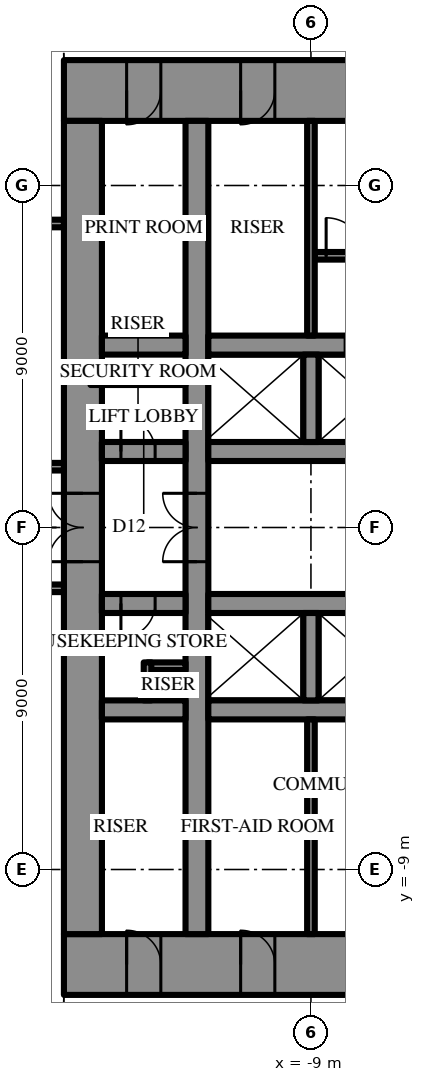
"""IFC4 building model, lengths in metres.
Left out: names, types, materials, properties, quantities, classifications, styles, units other than length and angle.
Written with IfcOpenShell. Run it as: python <this file> out.ifc"""

import sys

from ifc_helpers import new_model, si_unit, direction, frame, frame_2d, origin, place, context, subcontext, project, spatial, rectangle, extrude, element, fill, save


model = new_model("IFC4")
c1 = context("Model", 3, precision=1e-05, world=origin(), true_north=direction((0.0, 1.0)))
c2 = subcontext(c1, "Body", "Model", "MODEL_VIEW")
j1 = project(units=[si_unit("LENGTHUNIT", "METRE"), si_unit("PLANEANGLEUNIT", "RADIAN")], contexts=[c1])
p1 = place(None, origin())
s1 = spatial("IfcSite", under=j1, at=p1, CompositionType="ELEMENT")
p2 = place(p1, origin())
s2 = spatial("IfcBuilding", under=s1, at=p2, CompositionType="ELEMENT")
p3 = place(p2, frame((0.0, 0.0, 244.9)))
s3 = spatial("IfcBuildingStorey", under=s2, at=p3, CompositionType="ELEMENT", Elevation=244.9)
p4 = place(p3, frame((-15.5, 11.5, 0.0), z_axis=(0.0, 0.0, 1.0), x_axis=(1.0, 0.0, 0.0)))
e1 = element("IfcWall", 1, at=p4, inside=s3, PredefinedType="SHEAR", context=c2, shape_type="SweptSolid", body=[
    extrude(rectangle(XDim=31.0, YDim=1.6, at=frame_2d((15.5, 0.0))), origin(), (0.0, 0.0, 1.0), 4.2),
])
p5 = place(p4, frame((16.35, 0.0, 0.0)))
e2 = element("IfcOpeningElement", 2, at=p5, cuts=e1, PredefinedType="OPENING", context=c2, shape_type="SweptSolid", body=[
    extrude(rectangle(XDim=0.9, YDim=2.2, at=frame_2d((0.45, 1.1))), frame((0.0, 0.81, 0.0), z_axis=(0.0, -1.0, 0.0), x_axis=(1.0, 0.0, 0.0)), (0.0, 0.0, 1.0), 1.62),
])
p6 = place(p4, frame((19.35, 0.0, 0.0)))
e3 = element("IfcOpeningElement", 3, at=p6, cuts=e1, PredefinedType="OPENING", context=c2, shape_type="SweptSolid", body=[
    extrude(rectangle(XDim=0.9, YDim=2.2, at=frame_2d((0.45, 1.1))), frame((0.0, 0.81, 0.0), z_axis=(0.0, -1.0, 0.0), x_axis=(1.0, 0.0, 0.0)), (0.0, 0.0, 1.0), 1.62),
])
p7 = place(p4, frame((22.4, 0.0, 0.0)))
e4 = element("IfcOpeningElement", 4, at=p7, cuts=e1, PredefinedType="OPENING", context=c2, shape_type="SweptSolid", body=[
    extrude(rectangle(XDim=1.0, YDim=2.2, at=frame_2d((0.5, 1.1))), frame((0.0, 0.81, 0.0), z_axis=(0.0, -1.0, 0.0), x_axis=(1.0, 0.0, 0.0)), (0.0, 0.0, 1.0), 1.62),
])
p8 = place(p4, frame((1.65, 0.0, 0.0)))
e5 = element("IfcOpeningElement", 5, at=p8, cuts=e1, PredefinedType="OPENING", context=c2, shape_type="SweptSolid", body=[
    extrude(rectangle(XDim=0.9, YDim=2.2, at=frame_2d((0.45, 1.1))), frame((0.0, 0.81, 0.0), z_axis=(0.0, -1.0, 0.0), x_axis=(1.0, 0.0, 0.0)), (0.0, 0.0, 1.0), 1.62),
])
p9 = place(p4, frame((4.65, 0.0, 0.0)))
e6 = element("IfcOpeningElement", 6, at=p9, cuts=e1, PredefinedType="OPENING", context=c2, shape_type="SweptSolid", body=[
    extrude(rectangle(XDim=0.9, YDim=2.2, at=frame_2d((0.45, 1.1))), frame((0.0, 0.81, 0.0), z_axis=(0.0, -1.0, 0.0), x_axis=(1.0, 0.0, 0.0)), (0.0, 0.0, 1.0), 1.62),
])
p10 = place(p4, frame((25.45, 0.0, 0.0)))
e7 = element("IfcOpeningElement", 7, at=p10, cuts=e1, PredefinedType="OPENING", context=c2, shape_type="SweptSolid", body=[
    extrude(rectangle(XDim=0.9, YDim=2.2, at=frame_2d((0.45, 1.1))), frame((0.0, 0.81, 0.0), z_axis=(0.0, -1.0, 0.0), x_axis=(1.0, 0.0, 0.0)), (0.0, 0.0, 1.0), 1.62),
])
p11 = place(p4, frame((28.45, 0.0, 0.0)))
e8 = element("IfcOpeningElement", 8, at=p11, cuts=e1, PredefinedType="OPENING", context=c2, shape_type="SweptSolid", body=[
    extrude(rectangle(XDim=0.9, YDim=2.2, at=frame_2d((0.45, 1.1))), frame((0.0, 0.81, 0.0), z_axis=(0.0, -1.0, 0.0), x_axis=(1.0, 0.0, 0.0)), (0.0, 0.0, 1.0), 1.62),
])
p12 = place(p3, frame((15.5, -11.5, 0.0), z_axis=(0.0, 0.0, 1.0), x_axis=(-1.0, 0.0, 0.0)))
e9 = element("IfcWall", 9, at=p12, inside=s3, PredefinedType="SHEAR", context=c2, shape_type="SweptSolid", body=[
    extrude(rectangle(XDim=31.0, YDim=1.6, at=frame_2d((15.5, 0.0))), origin(), (0.0, 0.0, 1.0), 4.2),
])
p13 = place(p12, frame((16.35, 0.0, 0.0)))
e10 = element("IfcOpeningElement", 10, at=p13, cuts=e9, PredefinedType="OPENING", context=c2, shape_type="SweptSolid", body=[
    extrude(rectangle(XDim=0.9, YDim=2.2, at=frame_2d((0.45, 1.1))), frame((0.0, 0.81, 0.0), z_axis=(0.0, -1.0, 0.0), x_axis=(1.0, 0.0, 0.0)), (0.0, 0.0, 1.0), 1.62),
])
p14 = place(p12, frame((19.35, 0.0, 0.0)))
e11 = element("IfcOpeningElement", 11, at=p14, cuts=e9, PredefinedType="OPENING", context=c2, shape_type="SweptSolid", body=[
    extrude(rectangle(XDim=0.9, YDim=2.2, at=frame_2d((0.45, 1.1))), frame((0.0, 0.81, 0.0), z_axis=(0.0, -1.0, 0.0), x_axis=(1.0, 0.0, 0.0)), (0.0, 0.0, 1.0), 1.62),
])
p15 = place(p12, frame((22.4, 0.0, 0.0)))
e12 = element("IfcOpeningElement", 12, at=p15, cuts=e9, PredefinedType="OPENING", context=c2, shape_type="SweptSolid", body=[
    extrude(rectangle(XDim=1.0, YDim=2.2, at=frame_2d((0.5, 1.1))), frame((0.0, 0.81, 0.0), z_axis=(0.0, -1.0, 0.0), x_axis=(1.0, 0.0, 0.0)), (0.0, 0.0, 1.0), 1.62),
])
p16 = place(p12, frame((1.65, 0.0, 0.0)))
e13 = element("IfcOpeningElement", 13, at=p16, cuts=e9, PredefinedType="OPENING", context=c2, shape_type="SweptSolid", body=[
    extrude(rectangle(XDim=0.9, YDim=2.2, at=frame_2d((0.45, 1.1))), frame((0.0, 0.81, 0.0), z_axis=(0.0, -1.0, 0.0), x_axis=(1.0, 0.0, 0.0)), (0.0, 0.0, 1.0), 1.62),
])
p17 = place(p12, frame((4.65, 0.0, 0.0)))
e14 = element("IfcOpeningElement", 14, at=p17, cuts=e9, PredefinedType="OPENING", context=c2, shape_type="SweptSolid", body=[
    extrude(rectangle(XDim=0.9, YDim=2.2, at=frame_2d((0.45, 1.1))), frame((0.0, 0.81, 0.0), z_axis=(0.0, -1.0, 0.0), x_axis=(1.0, 0.0, 0.0)), (0.0, 0.0, 1.0), 1.62),
])
p18 = place(p12, frame((25.45, 0.0, 0.0)))
e15 = element("IfcOpeningElement", 15, at=p18, cuts=e9, PredefinedType="OPENING", context=c2, shape_type="SweptSolid", body=[
    extrude(rectangle(XDim=0.9, YDim=2.2, at=frame_2d((0.45, 1.1))), frame((0.0, 0.81, 0.0), z_axis=(0.0, -1.0, 0.0), x_axis=(1.0, 0.0, 0.0)), (0.0, 0.0, 1.0), 1.62),
])
p19 = place(p12, frame((28.45, 0.0, 0.0)))
e16 = element("IfcOpeningElement", 16, at=p19, cuts=e9, PredefinedType="OPENING", context=c2, shape_type="SweptSolid", body=[
    extrude(rectangle(XDim=0.9, YDim=2.2, at=frame_2d((0.45, 1.1))), frame((0.0, 0.81, 0.0), z_axis=(0.0, -1.0, 0.0), x_axis=(1.0, 0.0, 0.0)), (0.0, 0.0, 1.0), 1.62),
])
p20 = place(p3, frame((-15.0, 10.7, 0.0), z_axis=(0.0, 0.0, 1.0), x_axis=(0.0, -1.0, 0.0)))
e17 = element("IfcWall", 17, at=p20, inside=s3, PredefinedType="SHEAR", context=c2, shape_type="SweptSolid", body=[
    extrude(rectangle(XDim=21.4, YDim=1.0, at=frame_2d((10.7, 0.0))), origin(), (0.0, 0.0, 1.0), 4.2),
])
p21 = place(p20, frame((9.8, 0.0, 0.0)))
e18 = element("IfcOpeningElement", 18, at=p21, cuts=e17, PredefinedType="OPENING", context=c2, shape_type="SweptSolid", body=[
    extrude(rectangle(XDim=1.8, YDim=2.4, at=frame_2d((0.9, 1.2))), frame((0.0, 0.51, 0.0), z_axis=(0.0, -1.0, 0.0), x_axis=(1.0, 0.0, 0.0)), (0.0, 0.0, 1.0), 1.02),
])
p22 = place(p3, frame((-12.0, -10.7, 0.0), z_axis=(0.0, 0.0, 1.0), x_axis=(0.0, 1.0, 0.0)))
e19 = element("IfcWall", 19, at=p22, inside=s3, PredefinedType="SHEAR", context=c2, shape_type="SweptSolid", body=[
    extrude(rectangle(XDim=21.4, YDim=0.6, at=frame_2d((10.7, 0.0))), origin(), (0.0, 0.0, 1.0), 4.2),
])
p23 = place(p22, frame((9.8, 0.0, 0.0)))
e20 = element("IfcOpeningElement", 20, at=p23, cuts=e19, PredefinedType="OPENING", context=c2, shape_type="SweptSolid", body=[
    extrude(rectangle(XDim=1.8, YDim=2.4, at=frame_2d((0.9, 1.2))), frame((0.0, 0.31, 0.0), z_axis=(0.0, -1.0, 0.0), x_axis=(1.0, 0.0, 0.0)), (0.0, 0.0, 1.0), 0.62),
])
p24 = place(p3, frame((-14.5, 2.0, 0.0), z_axis=(0.0, 0.0, 1.0), x_axis=(1.0, 0.0, 0.0)))
e21 = element("IfcWall", 21, at=p24, inside=s3, PredefinedType="SHEAR", context=c2, shape_type="SweptSolid", body=[
    extrude(rectangle(XDim=2.2, YDim=0.5, at=frame_2d((1.1, 0.0))), origin(), (0.0, 0.0, 1.0), 4.2),
])
p25 = place(p24, frame((0.5, 0.0, 0.0)))
e22 = element("IfcOpeningElement", 22, at=p25, cuts=e21, PredefinedType="OPENING", context=c2, shape_type="SweptSolid", body=[
    extrude(rectangle(XDim=0.9, YDim=2.2, at=frame_2d((0.45, 1.1))), frame((0.0, 0.26, 0.0), z_axis=(0.0, -1.0, 0.0), x_axis=(1.0, 0.0, 0.0)), (0.0, 0.0, 1.0), 0.52),
])
p26 = place(p3, frame((-11.7, 2.0, 0.0), z_axis=(0.0, 0.0, 1.0), x_axis=(1.0, 0.0, 0.0)))
e23 = element("IfcWall", 23, at=p26, inside=s3, PredefinedType="SHEAR", context=c2, shape_type="SweptSolid", body=[
    extrude(rectangle(XDim=5.9, YDim=0.5, at=frame_2d((2.95, 0.0))), origin(), (0.0, 0.0, 1.0), 4.2),
])
p27 = place(p3, frame((-14.5, 4.8, 0.0), z_axis=(0.0, 0.0, 1.0), x_axis=(1.0, 0.0, 0.0)))
e24 = element("IfcWall", 24, at=p27, inside=s3, PredefinedType="SHEAR", context=c2, shape_type="SweptSolid", body=[
    extrude(rectangle(XDim=2.2, YDim=0.5, at=frame_2d((1.1, 0.0))), origin(), (0.0, 0.0, 1.0), 4.2),
])
p28 = place(p3, frame((-11.7, 4.8, 0.0), z_axis=(0.0, 0.0, 1.0), x_axis=(1.0, 0.0, 0.0)))
e25 = element("IfcWall", 25, at=p28, inside=s3, PredefinedType="SHEAR", context=c2, shape_type="SweptSolid", body=[
    extrude(rectangle(XDim=23.4, YDim=0.5, at=frame_2d((11.7, 0.0))), origin(), (0.0, 0.0, 1.0), 4.2),
])
p29 = place(p28, frame((6.6, 0.0, 0.0)))
e26 = element("IfcOpeningElement", 26, at=p29, cuts=e25, PredefinedType="OPENING", context=c2, shape_type="SweptSolid", body=[
    extrude(rectangle(XDim=1.2, YDim=2.2, at=frame_2d((0.6, 1.1))), frame((0.0, 0.26, 0.0), z_axis=(0.0, -1.0, 0.0), x_axis=(1.0, 0.0, 0.0)), (0.0, 0.0, 1.0), 0.52),
])
p30 = place(p28, frame((3.6, 0.0, 0.0)))
e27 = element("IfcOpeningElement", 27, at=p30, cuts=e25, PredefinedType="OPENING", context=c2, shape_type="SweptSolid", body=[
    extrude(rectangle(XDim=1.2, YDim=2.2, at=frame_2d((0.6, 1.1))), frame((0.0, 0.26, 0.0), z_axis=(0.0, -1.0, 0.0), x_axis=(1.0, 0.0, 0.0)), (0.0, 0.0, 1.0), 0.52),
])
p31 = place(p3, frame((-9.0, 2.25, 0.0), z_axis=(0.0, 0.0, 1.0), x_axis=(0.0, 1.0, 0.0)))
e28 = element("IfcWall", 28, at=p31, inside=s3, PredefinedType="SHEAR", context=c2, shape_type="SweptSolid", body=[
    extrude(rectangle(XDim=2.3, YDim=0.4, at=frame_2d((1.15, 0.0))), origin(), (0.0, 0.0, 1.0), 4.2),
])
p32 = place(p3, frame((-8.9, 7.15, 0.0), z_axis=(0.0, 0.0, 1.0), x_axis=(1.0, 0.0, 0.0)))
e29 = element("IfcWall", 29, at=p32, inside=s3, PredefinedType="SHEAR", context=c2, shape_type="SweptSolid", body=[
    extrude(rectangle(XDim=8.6, YDim=0.2, at=frame_2d((4.3, 0.0))), origin(), (0.0, 0.0, 1.0), 4.2),
])
p33 = place(p32, frame((0.3, 0.0, 0.0)))
e30 = element("IfcOpeningElement", 30, at=p33, cuts=e29, PredefinedType="OPENING", context=c2, shape_type="SweptSolid", body=[
    extrude(rectangle(XDim=1.0, YDim=2.2, at=frame_2d((0.5, 1.1))), frame((0.0, 0.11, 0.0), z_axis=(0.0, -1.0, 0.0), x_axis=(1.0, 0.0, 0.0)), (0.0, 0.0, 1.0), 0.22),
])
p34 = place(p3, frame((3.2, -2.0, 0.0), z_axis=(0.0, 0.0, 1.0), x_axis=(-1.0, 0.0, 0.0)))
e31 = element("IfcWall", 31, at=p34, inside=s3, PredefinedType="SHEAR", context=c2, shape_type="SweptSolid", body=[
    extrude(rectangle(XDim=14.9, YDim=0.5, at=frame_2d((7.45, 0.0))), origin(), (0.0, 0.0, 1.0), 4.2),
])
p35 = place(p34, frame((1.15, 0.0, 0.0)))
e32 = element("IfcOpeningElement", 32, at=p35, cuts=e31, PredefinedType="OPENING", context=c2, shape_type="SweptSolid", body=[
    extrude(rectangle(XDim=1.1, YDim=2.2, at=frame_2d((0.55, 1.1))), frame((0.0, 0.26, 0.0), z_axis=(0.0, -1.0, 0.0), x_axis=(1.0, 0.0, 0.0)), (0.0, 0.0, 1.0), 0.52),
])
p36 = place(p34, frame((4.15, 0.0, 0.0)))
e33 = element("IfcOpeningElement", 33, at=p36, cuts=e31, PredefinedType="OPENING", context=c2, shape_type="SweptSolid", body=[
    extrude(rectangle(XDim=1.1, YDim=2.2, at=frame_2d((0.55, 1.1))), frame((0.0, 0.26, 0.0), z_axis=(0.0, -1.0, 0.0), x_axis=(1.0, 0.0, 0.0)), (0.0, 0.0, 1.0), 0.52),
])
p37 = place(p34, frame((7.15, 0.0, 0.0)))
e34 = element("IfcOpeningElement", 34, at=p37, cuts=e31, PredefinedType="OPENING", context=c2, shape_type="SweptSolid", body=[
    extrude(rectangle(XDim=1.1, YDim=2.2, at=frame_2d((0.55, 1.1))), frame((0.0, 0.26, 0.0), z_axis=(0.0, -1.0, 0.0), x_axis=(1.0, 0.0, 0.0)), (0.0, 0.0, 1.0), 0.52),
])
p38 = place(p34, frame((10.15, 0.0, 0.0)))
e35 = element("IfcOpeningElement", 35, at=p38, cuts=e31, PredefinedType="OPENING", context=c2, shape_type="SweptSolid", body=[
    extrude(rectangle(XDim=1.1, YDim=2.2, at=frame_2d((0.55, 1.1))), frame((0.0, 0.26, 0.0), z_axis=(0.0, -1.0, 0.0), x_axis=(1.0, 0.0, 0.0)), (0.0, 0.0, 1.0), 0.52),
])
p39 = place(p3, frame((-12.3, -2.0, 0.0), z_axis=(0.0, 0.0, 1.0), x_axis=(-1.0, 0.0, 0.0)))
e36 = element("IfcWall", 36, at=p39, inside=s3, PredefinedType="SHEAR", context=c2, shape_type="SweptSolid", body=[
    extrude(rectangle(XDim=2.2, YDim=0.5, at=frame_2d((1.1, 0.0))), origin(), (0.0, 0.0, 1.0), 4.2),
])
p40 = place(p39, frame((0.8, 0.0, 0.0)))
e37 = element("IfcOpeningElement", 37, at=p40, cuts=e36, PredefinedType="OPENING", context=c2, shape_type="SweptSolid", body=[
    extrude(rectangle(XDim=0.9, YDim=2.2, at=frame_2d((0.45, 1.1))), frame((0.0, 0.26, 0.0), z_axis=(0.0, -1.0, 0.0), x_axis=(1.0, 0.0, 0.0)), (0.0, 0.0, 1.0), 0.52),
])
p41 = place(p3, frame((11.7, -4.8, 0.0), z_axis=(0.0, 0.0, 1.0), x_axis=(-1.0, 0.0, 0.0)))
e38 = element("IfcWall", 38, at=p41, inside=s3, PredefinedType="SHEAR", context=c2, shape_type="SweptSolid", body=[
    extrude(rectangle(XDim=23.4, YDim=0.5, at=frame_2d((11.7, 0.0))), origin(), (0.0, 0.0, 1.0), 4.2),
])
p42 = place(p41, frame((6.6, 0.0, 0.0)))
e39 = element("IfcOpeningElement", 39, at=p42, cuts=e38, PredefinedType="OPENING", context=c2, shape_type="SweptSolid", body=[
    extrude(rectangle(XDim=1.2, YDim=2.2, at=frame_2d((0.6, 1.1))), frame((0.0, 0.26, 0.0), z_axis=(0.0, -1.0, 0.0), x_axis=(1.0, 0.0, 0.0)), (0.0, 0.0, 1.0), 0.52),
])
p43 = place(p41, frame((3.6, 0.0, 0.0)))
e40 = element("IfcOpeningElement", 40, at=p43, cuts=e38, PredefinedType="OPENING", context=c2, shape_type="SweptSolid", body=[
    extrude(rectangle(XDim=1.2, YDim=2.2, at=frame_2d((0.6, 1.1))), frame((0.0, 0.26, 0.0), z_axis=(0.0, -1.0, 0.0), x_axis=(1.0, 0.0, 0.0)), (0.0, 0.0, 1.0), 0.52),
])
p44 = place(p3, frame((-12.3, -4.8, 0.0), z_axis=(0.0, 0.0, 1.0), x_axis=(-1.0, 0.0, 0.0)))
e41 = element("IfcWall", 41, at=p44, inside=s3, PredefinedType="SHEAR", context=c2, shape_type="SweptSolid", body=[
    extrude(rectangle(XDim=2.2, YDim=0.5, at=frame_2d((1.1, 0.0))), origin(), (0.0, 0.0, 1.0), 4.2),
])
p45 = place(p3, frame((-9.0, -2.25, 0.0), z_axis=(0.0, 0.0, 1.0), x_axis=(0.0, -1.0, 0.0)))
e42 = element("IfcWall", 42, at=p45, inside=s3, PredefinedType="SHEAR", context=c2, shape_type="SweptSolid", body=[
    extrude(rectangle(XDim=2.3, YDim=0.4, at=frame_2d((1.15, 0.0))), origin(), (0.0, 0.0, 1.0), 4.2),
])
for number, where, z_axis, x_axis in (
    (43, (-9.0, 5.05, 0.0), (0.0, 0.0, 1.0), (0.0, 1.0, 0.0)),
    (44, (-9.0, -5.05, 0.0), (0.0, 0.0, 1.0), (0.0, -1.0, 0.0)),
):
    element("IfcWall", number, at=place(p3, frame(where, z_axis=z_axis, x_axis=x_axis)), inside=s3, PredefinedType="PARTITIONING", context=c2, shape_type="SweptSolid", body=[
        extrude(rectangle(XDim=5.65, YDim=0.2, at=frame_2d((2.825, 0.0))), origin(), (0.0, 0.0, 1.0), 4.0),
    ])
p46 = place(p3, frame((-14.8, 3.85, 0.0), z_axis=(0.0, 0.0, 1.0), x_axis=(1.0, 0.0, 0.0)))
e45 = element("IfcWall", 45, at=p46, inside=s3, PredefinedType="PARTITIONING", context=c2, shape_type="SweptSolid", body=[
    extrude(rectangle(XDim=2.5, YDim=0.2, at=frame_2d((1.25, 0.0))), origin(), (0.0, 0.0, 1.0), 4.0),
])
for number, where, z_axis, x_axis in (
    (46, (-12.3, -3.65, 0.0), (0.0, 0.0, 1.0), (-1.0, 0.0, 0.0)),
    (47, (-13.3, -3.55, 0.0), (0.0, 0.0, 1.0), (0.0, -1.0, 0.0)),
):
    element("IfcWall", number, at=place(p3, frame(where, z_axis=z_axis, x_axis=x_axis)), inside=s3, PredefinedType="PARTITIONING", context=c2, shape_type="SweptSolid", body=[
        extrude(rectangle(XDim=1.0, YDim=0.2, at=frame_2d((0.5, 0.0))), origin(), (0.0, 0.0, 1.0), 4.0),
    ])
p47 = place(p3, frame((-15.5, 1.6, 0.0), z_axis=(0.0, 0.0, 1.0), x_axis=(-1.0, 0.0, 0.0)))
e48 = element("IfcWall", 48, at=p47, inside=s3, PredefinedType="PARTITIONING", context=c2, shape_type="SweptSolid", body=[
    extrude(rectangle(XDim=10.7, YDim=0.2, at=frame_2d((5.35, 0.0))), origin(), (0.0, 0.0, 1.0), 4.0),
])
p48 = place(p47, frame((4.85, 0.0, 0.0)))
e49 = element("IfcOpeningElement", 49, at=p48, cuts=e48, PredefinedType="OPENING", context=c2, shape_type="SweptSolid", body=[
    extrude(rectangle(XDim=1.0, YDim=2.2, at=frame_2d((0.5, 1.1))), frame((0.0, 0.11, 0.0), z_axis=(0.0, -1.0, 0.0), x_axis=(1.0, 0.0, 0.0)), (0.0, 0.0, 1.0), 0.22),
])
p49 = place(p3, frame((-15.5, -1.6, 0.0), z_axis=(0.0, 0.0, 1.0), x_axis=(-1.0, 0.0, 0.0)))
e50 = element("IfcWall", 50, at=p49, inside=s3, PredefinedType="PARTITIONING", context=c2, shape_type="SweptSolid", body=[
    extrude(rectangle(XDim=10.7, YDim=0.2, at=frame_2d((5.35, 0.0))), origin(), (0.0, 0.0, 1.0), 4.0),
])
p50 = place(p49, frame((4.85, 0.0, 0.0)))
e51 = element("IfcOpeningElement", 51, at=p50, cuts=e50, PredefinedType="OPENING", context=c2, shape_type="SweptSolid", body=[
    extrude(rectangle(XDim=1.0, YDim=2.2, at=frame_2d((0.5, 1.1))), frame((0.0, 0.11, 0.0), z_axis=(0.0, -1.0, 0.0), x_axis=(1.0, 0.0, 0.0)), (0.0, 0.0, 1.0), 0.22),
])
p51 = place(p3, frame((-15.5, 8.0, 0.0), z_axis=(0.0, 0.0, 1.0), x_axis=(-1.0, 0.0, 0.0)))
e52 = element("IfcWall", 52, at=p51, inside=s3, PredefinedType="PARTITIONING", context=c2, shape_type="SweptSolid", body=[
    extrude(rectangle(XDim=13.113, YDim=0.2, at=frame_2d((6.557, 0.0))), origin(), (0.0, 0.0, 1.0), 4.0),
])
p52 = place(p51, frame((0.811, 0.0, 0.0)))
e53 = element("IfcOpeningElement", 53, at=p52, cuts=e52, PredefinedType="OPENING", context=c2, shape_type="SweptSolid", body=[
    extrude(rectangle(XDim=1.0, YDim=2.2, at=frame_2d((0.5, 1.1))), frame((0.0, 0.11, 0.0), z_axis=(0.0, -1.0, 0.0), x_axis=(1.0, 0.0, 0.0)), (0.0, 0.0, 1.0), 0.22),
])
p53 = place(p21, frame((1.8, 0.0, 0.0), z_axis=(0.0, 0.0, 1.0), x_axis=(-1.0, 0.0, 0.0)))
e54 = element("IfcDoor", 54, at=p53, inside=s3, OperationType="DOUBLE_DOOR_SINGLE_SWING", PredefinedType="DOOR", context=c2, shape_type="SweptSolid", body=[
    extrude(rectangle(XDim=1.8, YDim=2.4, at=frame_2d((0.9, 1.2))), frame((0.0, 0.025, 0.0), z_axis=(0.0, -1.0, 0.0), x_axis=(1.0, 0.0, 0.0)), (0.0, 0.0, 1.0), 0.05),
])
fill(e18, e54)
p54 = place(p33, origin())
e55 = element("IfcDoor", 55, at=p54, inside=s3, OperationType="SINGLE_SWING_RIGHT", PredefinedType="DOOR", context=c2, shape_type="SweptSolid", body=[
    extrude(rectangle(XDim=1.0, YDim=2.2, at=frame_2d((0.5, 1.1))), frame((0.0, 0.025, 0.0), z_axis=(0.0, -1.0, 0.0), x_axis=(1.0, 0.0, 0.0)), (0.0, 0.0, 1.0), 0.05),
])
fill(e30, e55)
p55 = place(p8, frame((0.9, 0.0, 0.0), z_axis=(0.0, 0.0, 1.0), x_axis=(-1.0, 0.0, 0.0)))
e56 = element("IfcDoor", 56, at=p55, inside=s3, OperationType="SINGLE_SWING_LEFT", PredefinedType="DOOR", context=c2, shape_type="SweptSolid", body=[
    extrude(rectangle(XDim=0.9, YDim=2.2, at=frame_2d((0.45, 1.1))), frame((0.0, 0.025, 0.0), z_axis=(0.0, -1.0, 0.0), x_axis=(1.0, 0.0, 0.0)), (0.0, 0.0, 1.0), 0.05),
])
fill(e5, e56)
p56 = place(p9, frame((0.9, 0.0, 0.0), z_axis=(0.0, 0.0, 1.0), x_axis=(-1.0, 0.0, 0.0)))
e57 = element("IfcDoor", 57, at=p56, inside=s3, OperationType="SINGLE_SWING_LEFT", PredefinedType="DOOR", context=c2, shape_type="SweptSolid", body=[
    extrude(rectangle(XDim=0.9, YDim=2.2, at=frame_2d((0.45, 1.1))), frame((0.0, 0.025, 0.0), z_axis=(0.0, -1.0, 0.0), x_axis=(1.0, 0.0, 0.0)), (0.0, 0.0, 1.0), 0.05),
])
fill(e6, e57)
p57 = place(p18, frame((0.9, 0.0, 0.0), z_axis=(0.0, 0.0, 1.0), x_axis=(-1.0, 0.0, 0.0)))
e58 = element("IfcDoor", 58, at=p57, inside=s3, OperationType="SINGLE_SWING_RIGHT", PredefinedType="DOOR", context=c2, shape_type="SweptSolid", body=[
    extrude(rectangle(XDim=0.9, YDim=2.2, at=frame_2d((0.45, 1.1))), frame((0.0, 0.025, 0.0), z_axis=(0.0, -1.0, 0.0), x_axis=(1.0, 0.0, 0.0)), (0.0, 0.0, 1.0), 0.05),
])
fill(e15, e58)
p58 = place(p19, frame((0.9, 0.0, 0.0), z_axis=(0.0, 0.0, 1.0), x_axis=(-1.0, 0.0, 0.0)))
e59 = element("IfcDoor", 59, at=p58, inside=s3, OperationType="SINGLE_SWING_RIGHT", PredefinedType="DOOR", context=c2, shape_type="SweptSolid", body=[
    extrude(rectangle(XDim=0.9, YDim=2.2, at=frame_2d((0.45, 1.1))), frame((0.0, 0.025, 0.0), z_axis=(0.0, -1.0, 0.0), x_axis=(1.0, 0.0, 0.0)), (0.0, 0.0, 1.0), 0.05),
])
fill(e16, e59)
p59 = place(p25, origin())
e60 = element("IfcDoor", 60, at=p59, inside=s3, OperationType="SINGLE_SWING_RIGHT", PredefinedType="DOOR", context=c2, shape_type="SweptSolid", body=[
    extrude(rectangle(XDim=0.9, YDim=2.2, at=frame_2d((0.45, 1.1))), frame((0.0, 0.025, 0.0), z_axis=(0.0, -1.0, 0.0), x_axis=(1.0, 0.0, 0.0)), (0.0, 0.0, 1.0), 0.05),
])
fill(e22, e60)
p60 = place(p40, origin())
e61 = element("IfcDoor", 61, at=p60, inside=s3, OperationType="SINGLE_SWING_LEFT", PredefinedType="DOOR", context=c2, shape_type="SweptSolid", body=[
    extrude(rectangle(XDim=0.9, YDim=2.2, at=frame_2d((0.45, 1.1))), frame((0.0, 0.025, 0.0), z_axis=(0.0, -1.0, 0.0), x_axis=(1.0, 0.0, 0.0)), (0.0, 0.0, 1.0), 0.05),
])
fill(e37, e61)
p61 = place(p23, origin())
e62 = element("IfcDoor", 62, at=p61, inside=s3, OperationType="DOUBLE_DOOR_SINGLE_SWING", PredefinedType="DOOR", context=c2, shape_type="SweptSolid", body=[
    extrude(rectangle(XDim=1.8, YDim=2.4, at=frame_2d((0.9, 1.2))), frame((0.0, 0.025, 0.0), z_axis=(0.0, -1.0, 0.0), x_axis=(1.0, 0.0, 0.0)), (0.0, 0.0, 1.0), 0.05),
])
fill(e20, e62)
save(model, sys.argv[1])
